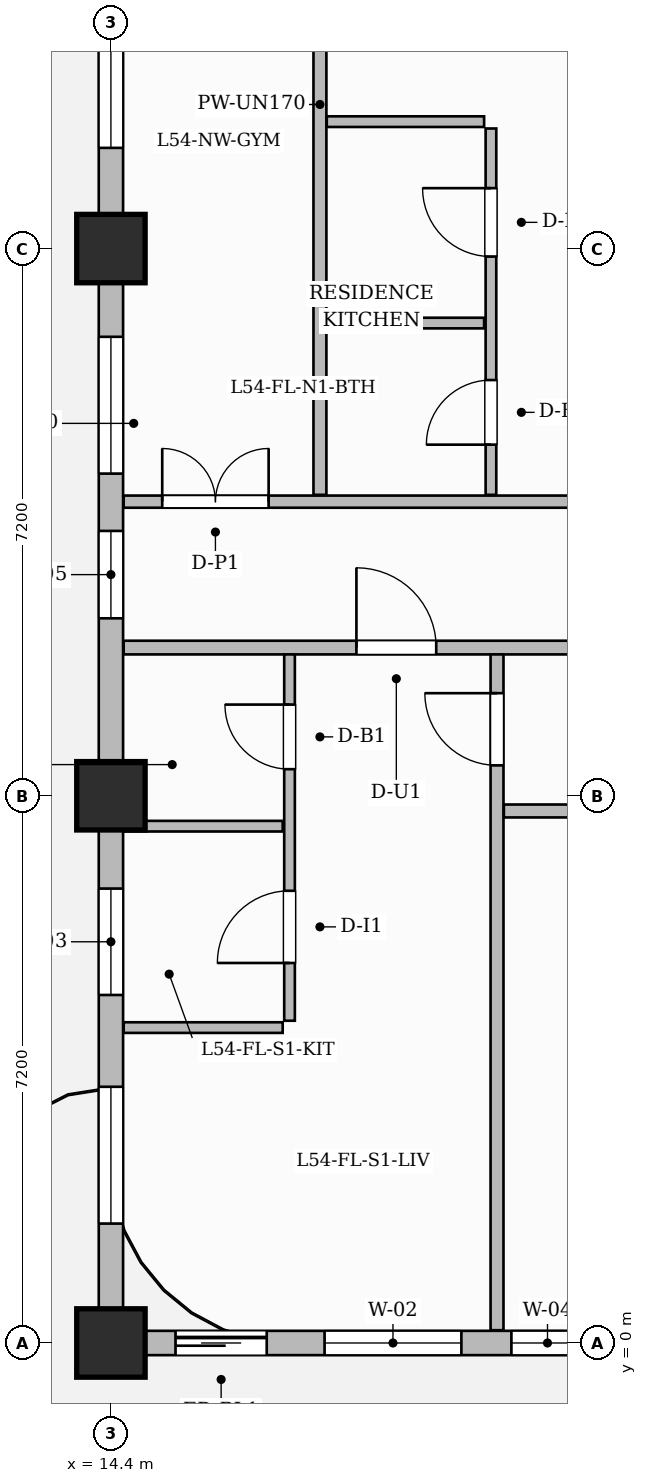
"""IFC4 building model, lengths in metres.
Left out: names, types, materials, properties, quantities, classifications, styles, units other than length and angle.
Written with IfcOpenShell. Run it as: python <this file> out.ifc"""

import sys

from ifc_helpers import new_model, si_unit, direction, frame, frame_2d, origin, origin_2d, place, context, subcontext, project, spatial, rectangle, extrude, source, transform, mapped, element, fill, save


model = new_model("IFC4")
c1 = context("Model", 3, precision=1e-05, world=origin(), true_north=direction((0.0, 1.0)))
c2 = subcontext(c1, "Body", "Model", "MODEL_VIEW")
j1 = project(units=[si_unit("LENGTHUNIT", "METRE"), si_unit("PLANEANGLEUNIT", "RADIAN")], contexts=[c1])
p1 = place(None, origin())
s1 = spatial("IfcSite", under=j1, at=p1, CompositionType="ELEMENT")
p2 = place(p1, origin())
s2 = spatial("IfcBuilding", under=s1, at=p2, CompositionType="ELEMENT")
p3 = place(p2, frame((0.0, 0.0, 217.3)))
s3 = spatial("IfcBuildingStorey", under=s2, at=p3, CompositionType="ELEMENT", Elevation=217.3)
m1 = source(origin(), c2, "Body", "SweptSolid", [
    extrude(rectangle(XDim=0.9, YDim=0.9, at=origin_2d()), origin(), (0.0, 0.0, 1.0), 3.85),
])
for number, where, z_axis, x_axis in (
    (1, (14.4, 0.0, 0.0), (0.0, 0.0, 1.0), (1.0, 0.0, 0.0)),
    (2, (14.4, 7.2, 0.0), (0.0, 0.0, 1.0), (1.0, 0.0, 0.0)),
    (3, (14.4, 14.4, 0.0), (0.0, 0.0, 1.0), (1.0, 0.0, 0.0)),
):
    element("IfcColumn", number, at=place(p3, frame(where, z_axis=z_axis, x_axis=x_axis)), inside=s3, PredefinedType="COLUMN", context=c2, shape_type="MappedRepresentation", body=[
        mapped(m1, transform((0.0, 0.0, 0.0), scale=1.0)),
    ])
p4 = place(p3, frame((14.568, 9.15, 0.0), z_axis=(0.0, 0.0, 1.0), x_axis=(1.0, 0.0, 0.0)))
e4 = element("IfcWall", 4, at=p4, inside=s3, PredefinedType="PARTITIONING", context=c2, shape_type="SweptSolid", body=[
    extrude(rectangle(XDim=15.542, YDim=0.18, at=frame_2d((7.771, 0.0))), origin(), (0.0, 0.0, 1.0), 3.6),
])
p5 = place(p4, frame((3.062, 0.0, 0.0)))
e5 = element("IfcOpeningElement", 5, at=p5, cuts=e4, PredefinedType="OPENING", context=c2, shape_type="SweptSolid", body=[
    extrude(rectangle(XDim=1.05, YDim=2.25, at=frame_2d((0.525, 1.125))), frame((0.0, 0.1, 0.0), z_axis=(0.0, -1.0, 0.0), x_axis=(1.0, 0.0, 0.0)), (0.0, 0.0, 1.0), 0.2),
])
p6 = place(p3, frame((14.568, 11.07, 0.0), z_axis=(0.0, 0.0, 1.0), x_axis=(1.0, 0.0, 0.0)))
e6 = element("IfcWall", 6, at=p6, inside=s3, PredefinedType="PARTITIONING", context=c2, shape_type="SweptSolid", body=[
    extrude(rectangle(XDim=15.542, YDim=0.16, at=frame_2d((7.771, 0.0))), origin(), (0.0, 0.0, 1.0), 3.6),
])
p7 = place(p6, frame((0.507, 0.0, 0.0)))
e7 = element("IfcOpeningElement", 7, at=p7, cuts=e6, PredefinedType="OPENING", context=c2, shape_type="SweptSolid", body=[
    extrude(rectangle(XDim=1.4, YDim=2.35, at=frame_2d((0.7, 1.175))), frame((0.0, 0.09, 0.0), z_axis=(0.0, -1.0, 0.0), x_axis=(1.0, 0.0, 0.0)), (0.0, 0.0, 1.0), 0.18),
])
p8 = place(p6, frame((6.507, 0.0, 0.0)))
e8 = element("IfcOpeningElement", 8, at=p8, cuts=e6, PredefinedType="OPENING", context=c2, shape_type="SweptSolid", body=[
    extrude(rectangle(XDim=1.05, YDim=2.25, at=frame_2d((0.525, 1.125))), frame((0.0, 0.09, 0.0), z_axis=(0.0, -1.0, 0.0), x_axis=(1.0, 0.0, 0.0)), (0.0, 0.0, 1.0), 0.18),
])
p9 = place(p3, frame((16.75, 4.24, 0.0), z_axis=(0.0, 0.0, 1.0), x_axis=(0.0, 1.0, 0.0)))
e9 = element("IfcWall", 9, at=p9, inside=s3, PredefinedType="PARTITIONING", context=c2, shape_type="SweptSolid", body=[
    extrude(rectangle(XDim=4.82, YDim=0.14, at=frame_2d((2.41, 0.0))), origin(), (0.0, 0.0, 1.0), 3.6),
])
p10 = place(p9, frame((0.76, 0.0, 0.0)))
e10 = element("IfcOpeningElement", 10, at=p10, cuts=e9, PredefinedType="OPENING", context=c2, shape_type="SweptSolid", body=[
    extrude(rectangle(XDim=0.95, YDim=2.15, at=frame_2d((0.475, 1.075))), frame((0.0, 0.08, 0.0), z_axis=(0.0, -1.0, 0.0), x_axis=(1.0, 0.0, 0.0)), (0.0, 0.0, 1.0), 0.16),
])
p11 = place(p9, frame((3.31, 0.0, 0.0)))
e11 = element("IfcOpeningElement", 11, at=p11, cuts=e9, PredefinedType="OPENING", context=c2, shape_type="SweptSolid", body=[
    extrude(rectangle(XDim=0.85, YDim=2.1, at=frame_2d((0.425, 1.05))), frame((0.0, 0.08, 0.0), z_axis=(0.0, -1.0, 0.0), x_axis=(1.0, 0.0, 0.0)), (0.0, 0.0, 1.0), 0.16),
])
p12 = place(p3, frame((14.59, 6.8, 0.0), z_axis=(0.0, 0.0, 1.0), x_axis=(1.0, 0.0, 0.0)))
e12 = element("IfcWall", 12, at=p12, inside=s3, PredefinedType="PARTITIONING", context=c2, shape_type="SweptSolid", body=[
    extrude(rectangle(XDim=2.07, YDim=0.14, at=frame_2d((1.035, 0.0))), origin(), (0.0, 0.0, 1.0), 3.6),
])
p13 = place(p3, frame((14.568, 4.15, 0.0), z_axis=(0.0, 0.0, 1.0), x_axis=(1.0, 0.0, 0.0)))
e13 = element("IfcWall", 13, at=p13, inside=s3, PredefinedType="PARTITIONING", context=c2, shape_type="SweptSolid", body=[
    extrude(rectangle(XDim=2.092, YDim=0.14, at=frame_2d((1.046, 0.0))), origin(), (0.0, 0.0, 1.0), 3.6),
])
p14 = place(p3, frame((19.48, 0.168, 0.0), z_axis=(0.0, 0.0, 1.0), x_axis=(0.0, 1.0, 0.0)))
e14 = element("IfcWall", 14, at=p14, inside=s3, PredefinedType="PARTITIONING", context=c2, shape_type="SweptSolid", body=[
    extrude(rectangle(XDim=8.892, YDim=0.17, at=frame_2d((4.446, 0.0))), origin(), (0.0, 0.0, 1.0), 3.6),
])
p15 = place(p14, frame((7.432, 0.0, 0.0)))
e15 = element("IfcOpeningElement", 15, at=p15, cuts=e14, PredefinedType="OPENING", context=c2, shape_type="SweptSolid", body=[
    extrude(rectangle(XDim=0.95, YDim=2.15, at=frame_2d((0.475, 1.075))), frame((0.0, 0.095, 0.0), z_axis=(0.0, -1.0, 0.0), x_axis=(1.0, 0.0, 0.0)), (0.0, 0.0, 1.0), 0.19),
])
p16 = place(p3, frame((19.57, 7.0, 0.0), z_axis=(0.0, 0.0, 1.0), x_axis=(1.0, 0.0, 0.0)))
e16 = element("IfcWall", 16, at=p16, inside=s3, PredefinedType="PARTITIONING", context=c2, shape_type="SweptSolid", body=[
    extrude(rectangle(XDim=10.54, YDim=0.17, at=frame_2d((5.27, 0.0))), origin(), (0.0, 0.0, 1.0), 3.135),
])
p17 = place(p16, frame((2.655, 0.0, 0.0)))
e17 = element("IfcOpeningElement", 17, at=p17, cuts=e16, PredefinedType="OPENING", context=c2, shape_type="SweptSolid", body=[
    extrude(rectangle(XDim=0.95, YDim=2.15, at=frame_2d((0.475, 1.075))), frame((0.0, 0.095, 0.0), z_axis=(0.0, -1.0, 0.0), x_axis=(1.0, 0.0, 0.0)), (0.0, 0.0, 1.0), 0.19),
])
p18 = place(p16, frame((6.425, 0.0, 0.0)))
e18 = element("IfcOpeningElement", 18, at=p18, cuts=e16, PredefinedType="OPENING", context=c2, shape_type="SweptSolid", body=[
    extrude(rectangle(XDim=0.95, YDim=2.15, at=frame_2d((0.475, 1.075))), frame((0.0, 0.095, 0.0), z_axis=(0.0, -1.0, 0.0), x_axis=(1.0, 0.0, 0.0)), (0.0, 0.0, 1.0), 0.19),
])
p19 = place(p3, frame((17.15, 11.16, 0.0), z_axis=(0.0, 0.0, 1.0), x_axis=(0.0, 1.0, 0.0)))
e19 = element("IfcWall", 19, at=p19, inside=s3, PredefinedType="PARTITIONING", context=c2, shape_type="SweptSolid", body=[
    extrude(rectangle(XDim=10.272, YDim=0.17, at=frame_2d((5.136, 0.0))), origin(), (0.0, 0.0, 1.0), 3.6),
])
p20 = place(p3, frame((19.4, 11.16, 0.0), z_axis=(0.0, 0.0, 1.0), x_axis=(0.0, 1.0, 0.0)))
e20 = element("IfcWall", 20, at=p20, inside=s3, PredefinedType="PARTITIONING", context=c2, shape_type="SweptSolid", body=[
    extrude(rectangle(XDim=4.82, YDim=0.14, at=frame_2d((2.41, 0.0))), origin(), (0.0, 0.0, 1.0), 3.6),
])
p21 = place(p20, frame((0.66, 0.0, 0.0)))
e21 = element("IfcOpeningElement", 21, at=p21, cuts=e20, PredefinedType="OPENING", context=c2, shape_type="SweptSolid", body=[
    extrude(rectangle(XDim=0.85, YDim=2.1, at=frame_2d((0.425, 1.05))), frame((0.0, 0.08, 0.0), z_axis=(0.0, -1.0, 0.0), x_axis=(1.0, 0.0, 0.0)), (0.0, 0.0, 1.0), 0.16),
])
p22 = place(p20, frame((3.135, 0.0, 0.0)))
e22 = element("IfcOpeningElement", 22, at=p22, cuts=e20, PredefinedType="OPENING", context=c2, shape_type="SweptSolid", body=[
    extrude(rectangle(XDim=0.9, YDim=2.15, at=frame_2d((0.45, 1.075))), frame((0.0, 0.08, 0.0), z_axis=(0.0, -1.0, 0.0), x_axis=(1.0, 0.0, 0.0)), (0.0, 0.0, 1.0), 0.16),
])
for number, where, z_axis, x_axis in (
    (23, (17.24, 13.42, 0.0), (0.0, 0.0, 1.0), (1.0, 0.0, 0.0)),
    (24, (17.24, 16.07, 0.0), (0.0, 0.0, 1.0), (1.0, 0.0, 0.0)),
):
    element("IfcWall", number, at=place(p3, frame(where, z_axis=z_axis, x_axis=x_axis)), inside=s3, PredefinedType="PARTITIONING", context=c2, shape_type="SweptSolid", body=[
        extrude(rectangle(XDim=2.07, YDim=0.14, at=frame_2d((1.035, 0.0))), origin(), (0.0, 0.0, 1.0), 3.6),
    ])
p23 = place(p3, frame((14.4, 0.0, 0.0), z_axis=(0.0, 0.0, 1.0), x_axis=(1.0, 0.0, 0.0)))
e25 = element("IfcWall", 25, at=p23, inside=s3, PredefinedType="SOLIDWALL", context=c2, shape_type="SweptSolid", body=[
    extrude(rectangle(XDim=35.4, YDim=0.32, at=frame_2d((17.7, 0.0))), origin(), (0.0, 0.0, 1.0), 3.135),
])
p24 = place(p23, frame((0.85, 0.0, 0.0)))
e26 = element("IfcOpeningElement", 26, at=p24, cuts=e25, PredefinedType="OPENING", context=c2, shape_type="SweptSolid", body=[
    extrude(rectangle(XDim=1.2, YDim=2.2, at=frame_2d((0.6, 1.1))), frame((0.0, 0.17, 0.0), z_axis=(0.0, -1.0, 0.0), x_axis=(1.0, 0.0, 0.0)), (0.0, 0.0, 1.0), 0.34),
])
p25 = place(p23, frame((2.811, 0.0, 0.8)))
e27 = element("IfcOpeningElement", 27, at=p25, cuts=e25, PredefinedType="OPENING", context=c2, shape_type="SweptSolid", body=[
    extrude(rectangle(XDim=1.8, YDim=1.85, at=frame_2d((0.9, 0.925))), frame((0.0, 0.17, 0.0), z_axis=(0.0, -1.0, 0.0), x_axis=(1.0, 0.0, 0.0)), (0.0, 0.0, 1.0), 0.34),
])
p26 = place(p23, frame((5.269, 0.0, 0.8)))
e28 = element("IfcOpeningElement", 28, at=p26, cuts=e25, PredefinedType="OPENING", context=c2, shape_type="SweptSolid", body=[
    extrude(rectangle(XDim=0.95, YDim=1.75, at=frame_2d((0.475, 0.875))), frame((0.0, 0.17, 0.0), z_axis=(0.0, -1.0, 0.0), x_axis=(1.0, 0.0, 0.0)), (0.0, 0.0, 1.0), 0.34),
])
p27 = place(p23, frame((8.516, 0.0, 0.8)))
e29 = element("IfcOpeningElement", 29, at=p27, cuts=e25, PredefinedType="OPENING", context=c2, shape_type="SweptSolid", body=[
    extrude(rectangle(XDim=1.4, YDim=1.85, at=frame_2d((0.7, 0.925))), frame((0.0, 0.17, 0.0), z_axis=(0.0, -1.0, 0.0), x_axis=(1.0, 0.0, 0.0)), (0.0, 0.0, 1.0), 0.34),
])
p28 = place(p23, frame((11.124, 0.0, 0.8)))
e30 = element("IfcOpeningElement", 30, at=p28, cuts=e25, PredefinedType="OPENING", context=c2, shape_type="SweptSolid", body=[
    extrude(rectangle(XDim=1.8, YDim=1.85, at=frame_2d((0.9, 0.925))), frame((0.0, 0.17, 0.0), z_axis=(0.0, -1.0, 0.0), x_axis=(1.0, 0.0, 0.0)), (0.0, 0.0, 1.0), 0.34),
])
p29 = place(p23, frame((16.804, 0.0, 0.8)))
e31 = element("IfcOpeningElement", 31, at=p29, cuts=e25, PredefinedType="OPENING", context=c2, shape_type="SweptSolid", body=[
    extrude(rectangle(XDim=1.8, YDim=1.85, at=frame_2d((0.9, 0.925))), frame((0.0, 0.17, 0.0), z_axis=(0.0, -1.0, 0.0), x_axis=(1.0, 0.0, 0.0)), (0.0, 0.0, 1.0), 0.34),
])
p30 = place(p23, frame((21.725, 0.0, 0.8)))
e32 = element("IfcOpeningElement", 32, at=p30, cuts=e25, PredefinedType="OPENING", context=c2, shape_type="SweptSolid", body=[
    extrude(rectangle(XDim=1.8, YDim=1.85, at=frame_2d((0.9, 0.925))), frame((0.0, 0.17, 0.0), z_axis=(0.0, -1.0, 0.0), x_axis=(1.0, 0.0, 0.0)), (0.0, 0.0, 1.0), 0.34),
])
p31 = place(p23, frame((24.475, 0.0, 0.8)))
e33 = element("IfcOpeningElement", 33, at=p31, cuts=e25, PredefinedType="OPENING", context=c2, shape_type="SweptSolid", body=[
    extrude(rectangle(XDim=1.8, YDim=1.85, at=frame_2d((0.9, 0.925))), frame((0.0, 0.17, 0.0), z_axis=(0.0, -1.0, 0.0), x_axis=(1.0, 0.0, 0.0)), (0.0, 0.0, 1.0), 0.34),
])
p32 = place(p23, frame((29.075, 0.0, 0.8)))
e34 = element("IfcOpeningElement", 34, at=p32, cuts=e25, PredefinedType="OPENING", context=c2, shape_type="SweptSolid", body=[
    extrude(rectangle(XDim=1.8, YDim=1.85, at=frame_2d((0.9, 0.925))), frame((0.0, 0.17, 0.0), z_axis=(0.0, -1.0, 0.0), x_axis=(1.0, 0.0, 0.0)), (0.0, 0.0, 1.0), 0.34),
])
p33 = place(p23, frame((32.125, 0.0, 0.8)))
e35 = element("IfcOpeningElement", 35, at=p33, cuts=e25, PredefinedType="OPENING", context=c2, shape_type="SweptSolid", body=[
    extrude(rectangle(XDim=1.8, YDim=1.85, at=frame_2d((0.9, 0.925))), frame((0.0, 0.17, 0.0), z_axis=(0.0, -1.0, 0.0), x_axis=(1.0, 0.0, 0.0)), (0.0, 0.0, 1.0), 0.34),
])
p34 = place(p3, frame((14.4, 0.05, 0.0), z_axis=(0.0, 0.0, 1.0), x_axis=(0.0, 1.0, 0.0)))
e36 = element("IfcWall", 36, at=p34, inside=s3, PredefinedType="SOLIDWALL", context=c2, shape_type="SweptSolid", body=[
    extrude(rectangle(XDim=21.5, YDim=0.32, at=frame_2d((10.75, 0.0))), origin(), (0.0, 0.0, 1.0), 3.135),
])
p35 = place(p34, frame((1.521, 0.0, 0.8)))
e37 = element("IfcOpeningElement", 37, at=p35, cuts=e36, PredefinedType="OPENING", context=c2, shape_type="SweptSolid", body=[
    extrude(rectangle(XDim=1.8, YDim=1.85, at=frame_2d((0.9, 0.925))), frame((0.0, 0.17, 0.0), z_axis=(0.0, -1.0, 0.0), x_axis=(1.0, 0.0, 0.0)), (0.0, 0.0, 1.0), 0.34),
])
p36 = place(p34, frame((4.529, 0.0, 0.8)))
e38 = element("IfcOpeningElement", 38, at=p36, cuts=e36, PredefinedType="OPENING", context=c2, shape_type="SweptSolid", body=[
    extrude(rectangle(XDim=1.4, YDim=1.85, at=frame_2d((0.7, 0.925))), frame((0.0, 0.17, 0.0), z_axis=(0.0, -1.0, 0.0), x_axis=(1.0, 0.0, 0.0)), (0.0, 0.0, 1.0), 0.34),
])
p37 = place(p34, frame((9.485, 0.0, 0.8)))
e39 = element("IfcOpeningElement", 39, at=p37, cuts=e36, PredefinedType="OPENING", context=c2, shape_type="SweptSolid", body=[
    extrude(rectangle(XDim=1.15, YDim=1.8, at=frame_2d((0.575, 0.9))), frame((0.0, 0.17, 0.0), z_axis=(0.0, -1.0, 0.0), x_axis=(1.0, 0.0, 0.0)), (0.0, 0.0, 1.0), 0.34),
])
p38 = place(p34, frame((11.389, 0.0, 0.8)))
e40 = element("IfcOpeningElement", 40, at=p38, cuts=e36, PredefinedType="OPENING", context=c2, shape_type="SweptSolid", body=[
    extrude(rectangle(XDim=1.8, YDim=1.85, at=frame_2d((0.9, 0.925))), frame((0.0, 0.17, 0.0), z_axis=(0.0, -1.0, 0.0), x_axis=(1.0, 0.0, 0.0)), (0.0, 0.0, 1.0), 0.34),
])
p39 = place(p34, frame((15.675, 0.0, 0.8)))
e41 = element("IfcOpeningElement", 41, at=p39, cuts=e36, PredefinedType="OPENING", context=c2, shape_type="SweptSolid", body=[
    extrude(rectangle(XDim=1.8, YDim=1.85, at=frame_2d((0.9, 0.925))), frame((0.0, 0.17, 0.0), z_axis=(0.0, -1.0, 0.0), x_axis=(1.0, 0.0, 0.0)), (0.0, 0.0, 1.0), 0.34),
])
p40 = place(p34, frame((18.425, 0.0, 0.8)))
e42 = element("IfcOpeningElement", 42, at=p40, cuts=e36, PredefinedType="OPENING", context=c2, shape_type="SweptSolid", body=[
    extrude(rectangle(XDim=1.8, YDim=1.85, at=frame_2d((0.9, 0.925))), frame((0.0, 0.17, 0.0), z_axis=(0.0, -1.0, 0.0), x_axis=(1.0, 0.0, 0.0)), (0.0, 0.0, 1.0), 0.34),
])
m2 = source(origin(), c2, "Body", "SweptSolid", [
    extrude(rectangle(XDim=0.95, YDim=2.15, at=frame_2d((0.475, 1.075))), frame((0.0, 0.025, 0.0), z_axis=(0.0, -1.0, 0.0), x_axis=(1.0, 0.0, 0.0)), (0.0, 0.0, 1.0), 0.05),
])
p41 = place(p10, origin())
e43 = element("IfcDoor", 43, at=p41, inside=s3, OperationType="SINGLE_SWING_LEFT", PredefinedType="DOOR", context=c2, shape_type="MappedRepresentation", body=[
    mapped(m2, transform((0.0, 0.0, 0.0), scale=1.0)),
])
fill(e10, e43)
m3 = source(origin(), c2, "Body", "SweptSolid", [
    extrude(rectangle(XDim=0.85, YDim=2.1, at=frame_2d((0.425, 1.05))), frame((0.0, 0.025, 0.0), z_axis=(0.0, -1.0, 0.0), x_axis=(1.0, 0.0, 0.0)), (0.0, 0.0, 1.0), 0.05),
])
p42 = place(p11, origin())
e44 = element("IfcDoor", 44, at=p42, inside=s3, OperationType="SINGLE_SWING_RIGHT", PredefinedType="DOOR", context=c2, shape_type="MappedRepresentation", body=[
    mapped(m3, transform((0.0, 0.0, 0.0), scale=1.0)),
])
fill(e11, e44)
m4 = source(origin(), c2, "Body", "SweptSolid", [
    extrude(rectangle(XDim=1.05, YDim=2.25, at=frame_2d((0.525, 1.125))), frame((0.0, 0.025, 0.0), z_axis=(0.0, -1.0, 0.0), x_axis=(1.0, 0.0, 0.0)), (0.0, 0.0, 1.0), 0.05),
])
p43 = place(p5, origin())
e45 = element("IfcDoor", 45, at=p43, inside=s3, OperationType="SINGLE_SWING_LEFT", PredefinedType="DOOR", context=c2, shape_type="MappedRepresentation", body=[
    mapped(m4, transform((0.0, 0.0, 0.0), scale=1.0)),
])
fill(e5, e45)
p44 = place(p15, origin())
e46 = element("IfcDoor", 46, at=p44, inside=s3, OperationType="SINGLE_SWING_RIGHT", PredefinedType="DOOR", context=c2, shape_type="MappedRepresentation", body=[
    mapped(m2, transform((0.0, 0.0, 0.0), scale=1.0)),
])
fill(e15, e46)
m5 = source(origin(), c2, "Body", "SweptSolid", [
    extrude(rectangle(XDim=1.4, YDim=2.35, at=frame_2d((0.7, 1.175))), frame((0.0, 0.025, 0.0), z_axis=(0.0, -1.0, 0.0), x_axis=(1.0, 0.0, 0.0)), (0.0, 0.0, 1.0), 0.05),
])
p45 = place(p7, origin())
e47 = element("IfcDoor", 47, at=p45, inside=s3, OperationType="DOUBLE_DOOR_SINGLE_SWING", PredefinedType="DOOR", context=c2, shape_type="MappedRepresentation", body=[
    mapped(m5, transform((0.0, 0.0, 0.0), scale=1.0)),
])
fill(e7, e47)
p46 = place(p21, origin())
e48 = element("IfcDoor", 48, at=p46, inside=s3, OperationType="SINGLE_SWING_LEFT", PredefinedType="DOOR", context=c2, shape_type="MappedRepresentation", body=[
    mapped(m3, transform((0.0, 0.0, 0.0), scale=1.0)),
])
fill(e21, e48)
m6 = source(origin(), c2, "Body", "SweptSolid", [
    extrude(rectangle(XDim=0.9, YDim=2.15, at=frame_2d((0.45, 1.075))), frame((0.0, 0.025, 0.0), z_axis=(0.0, -1.0, 0.0), x_axis=(1.0, 0.0, 0.0)), (0.0, 0.0, 1.0), 0.05),
])
p47 = place(p22, origin())
e49 = element("IfcDoor", 49, at=p47, inside=s3, OperationType="SINGLE_SWING_RIGHT", PredefinedType="DOOR", context=c2, shape_type="MappedRepresentation", body=[
    mapped(m6, transform((0.0, 0.0, 0.0), scale=1.0)),
])
fill(e22, e49)
m7 = source(origin(), c2, "Body", "SweptSolid", [
    extrude(rectangle(XDim=1.2, YDim=2.2, at=frame_2d((0.6, 1.1))), frame((0.0, 0.025, 0.0), z_axis=(0.0, -1.0, 0.0), x_axis=(1.0, 0.0, 0.0)), (0.0, 0.0, 1.0), 0.05),
])
p48 = place(p24, origin())
e50 = element("IfcDoor", 50, at=p48, inside=s3, OperationType="SLIDING_TO_LEFT", PredefinedType="DOOR", context=c2, shape_type="MappedRepresentation", body=[
    mapped(m7, transform((0.0, 0.0, 0.0), scale=1.0)),
])
fill(e26, e50)
m8 = source(origin(), c2, "Body", "SweptSolid", [
    extrude(rectangle(XDim=1.8, YDim=1.85, at=frame_2d((0.9, 0.925))), frame((0.0, 0.03, 0.0), z_axis=(0.0, -1.0, 0.0), x_axis=(1.0, 0.0, 0.0)), (0.0, 0.0, 1.0), 0.06),
])
p49 = place(p25, origin())
e51 = element("IfcWindow", 51, at=p49, inside=s3, PartitioningType="DOUBLE_PANEL_VERTICAL", PredefinedType="WINDOW", context=c2, shape_type="MappedRepresentation", body=[
    mapped(m8, transform((0.0, 0.0, 0.0), scale=1.0)),
])
fill(e27, e51)
m9 = source(origin(), c2, "Body", "SweptSolid", [
    extrude(rectangle(XDim=0.95, YDim=1.75, at=frame_2d((0.475, 0.875))), frame((0.0, 0.03, 0.0), z_axis=(0.0, -1.0, 0.0), x_axis=(1.0, 0.0, 0.0)), (0.0, 0.0, 1.0), 0.06),
])
p50 = place(p26, origin())
e52 = element("IfcWindow", 52, at=p50, inside=s3, PartitioningType="SINGLE_PANEL", PredefinedType="WINDOW", context=c2, shape_type="MappedRepresentation", body=[
    mapped(m9, transform((0.0, 0.0, 0.0), scale=1.0)),
])
fill(e28, e52)
p51 = place(p35, origin())
e53 = element("IfcWindow", 53, at=p51, inside=s3, PartitioningType="DOUBLE_PANEL_VERTICAL", PredefinedType="WINDOW", context=c2, shape_type="MappedRepresentation", body=[
    mapped(m8, transform((0.0, 0.0, 0.0), scale=1.0)),
])
fill(e37, e53)
m10 = source(origin(), c2, "Body", "SweptSolid", [
    extrude(rectangle(XDim=1.4, YDim=1.85, at=frame_2d((0.7, 0.925))), frame((0.0, 0.03, 0.0), z_axis=(0.0, -1.0, 0.0), x_axis=(1.0, 0.0, 0.0)), (0.0, 0.0, 1.0), 0.06),
])
p52 = place(p36, origin())
e54 = element("IfcWindow", 54, at=p52, inside=s3, PartitioningType="SINGLE_PANEL", PredefinedType="WINDOW", context=c2, shape_type="MappedRepresentation", body=[
    mapped(m10, transform((0.0, 0.0, 0.0), scale=1.0)),
])
fill(e38, e54)
m11 = source(origin(), c2, "Body", "SweptSolid", [
    extrude(rectangle(XDim=1.15, YDim=1.8, at=frame_2d((0.575, 0.9))), frame((0.0, 0.03, 0.0), z_axis=(0.0, -1.0, 0.0), x_axis=(1.0, 0.0, 0.0)), (0.0, 0.0, 1.0), 0.06),
])
p53 = place(p37, origin())
e55 = element("IfcWindow", 55, at=p53, inside=s3, PartitioningType="SINGLE_PANEL", PredefinedType="WINDOW", context=c2, shape_type="MappedRepresentation", body=[
    mapped(m11, transform((0.0, 0.0, 0.0), scale=1.0)),
])
fill(e39, e55)
p54 = place(p38, origin())
e56 = element("IfcWindow", 56, at=p54, inside=s3, PartitioningType="DOUBLE_PANEL_VERTICAL", PredefinedType="WINDOW", context=c2, shape_type="MappedRepresentation", body=[
    mapped(m8, transform((0.0, 0.0, 0.0), scale=1.0)),
])
fill(e40, e56)
p55 = place(p39, origin())
e57 = element("IfcWindow", 57, at=p55, inside=s3, PartitioningType="DOUBLE_PANEL_VERTICAL", PredefinedType="WINDOW", context=c2, shape_type="MappedRepresentation", body=[
    mapped(m8, transform((0.0, 0.0, 0.0), scale=1.0)),
])
fill(e41, e57)
save(model, sys.argv[1])
